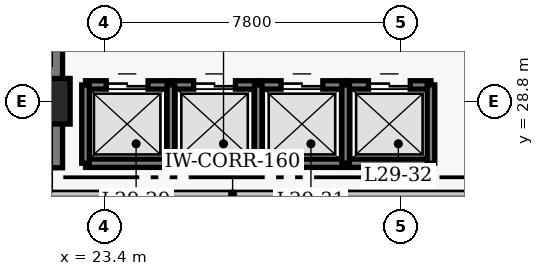
"""IFC4 building model, lengths in metres.
Left out: names, types, materials, properties, quantities, classifications, styles, units other than length and angle.
Written with IfcOpenShell. Run it as: python <this file> out.ifc"""

import sys

from ifc_helpers import new_model, si_unit, direction, frame, frame_2d, origin, origin_2d, place, context, subcontext, project, spatial, rectangle, extrude, element, fill, save


model = new_model("IFC4")
c1 = context("Model", 3, precision=1e-05, world=origin(), true_north=direction((0.0, 1.0)))
c2 = subcontext(c1, "Body", "Model", "MODEL_VIEW")
j1 = project(units=[si_unit("LENGTHUNIT", "METRE"), si_unit("PLANEANGLEUNIT", "RADIAN")], contexts=[c1])
p1 = place(None, origin())
s1 = spatial("IfcSite", under=j1, at=p1, CompositionType="ELEMENT")
p2 = place(p1, origin())
s2 = spatial("IfcBuilding", under=s1, at=p2, CompositionType="ELEMENT")
p3 = place(p2, frame((0.0, 0.0, 118.4)))
s3 = spatial("IfcBuildingStorey", under=s2, at=p3, CompositionType="ELEMENT", Elevation=118.4)
p4 = place(p3, frame((21.9, 27.05, 0.0), z_axis=(0.0, 0.0, 1.0), x_axis=(0.0, 1.0, 0.0)))
e1 = element("IfcWall", 1, at=p4, inside=s3, PredefinedType="SHEAR", context=c2, shape_type="SweptSolid", body=[
    extrude(rectangle(XDim=13.67, YDim=0.8, at=frame_2d((6.835, 0.0))), origin(), (0.0, 0.0, 1.0), 3.8),
])
p5 = place(p3, frame((21.9, 28.8, 0.0), z_axis=(0.0, 0.0, 1.0), x_axis=(1.0, 0.0, 0.0)))
e2 = element("IfcColumn", 2, at=p5, inside=s3, PredefinedType="COLUMN", context=c2, shape_type="SweptSolid", body=[
    extrude(rectangle(XDim=1.2, YDim=1.2, at=origin_2d()), origin(), (0.0, 0.0, 1.0), 3.8),
])
p6 = place(p3, frame((22.905, 29.23, 0.0), z_axis=(0.0, 0.0, 1.0), x_axis=(1.0, 0.0, 0.0)))
e3 = element("IfcWall", 3, at=p6, inside=s3, PredefinedType="SHEAR", context=c2, shape_type="SweptSolid", body=[
    extrude(rectangle(XDim=2.245, YDim=0.22, at=frame_2d((1.123, 0.0))), origin(), (0.0, 0.0, 1.0), 3.8),
])
p7 = place(p6, frame((0.545, 0.0, 0.0)))
e4 = element("IfcOpeningElement", 4, at=p7, cuts=e3, PredefinedType="OPENING", context=c2, shape_type="SweptSolid", body=[
    extrude(rectangle(XDim=1.1, YDim=2.15, at=frame_2d((0.55, 1.075))), frame((0.0, 0.12, 0.0), z_axis=(0.0, -1.0, 0.0), x_axis=(1.0, 0.0, 0.0)), (0.0, 0.0, 1.0), 0.24),
])
p8 = place(p3, frame((22.905, 27.17, 0.0), z_axis=(0.0, 0.0, 1.0), x_axis=(1.0, 0.0, 0.0)))
e5 = element("IfcWall", 5, at=p8, inside=s3, PredefinedType="SHEAR", context=c2, shape_type="SweptSolid", body=[
    extrude(rectangle(XDim=2.245, YDim=0.22, at=frame_2d((1.123, 0.0))), origin(), (0.0, 0.0, 1.0), 3.8),
])
p9 = place(p3, frame((22.905, 27.17, 0.0), z_axis=(0.0, 0.0, 1.0), x_axis=(0.0, 1.0, 0.0)))
e6 = element("IfcWall", 6, at=p9, inside=s3, PredefinedType="SHEAR", context=c2, shape_type="SweptSolid", body=[
    extrude(rectangle(XDim=2.06, YDim=0.2, at=frame_2d((1.03, 0.0))), origin(), (0.0, 0.0, 1.0), 3.8),
])
p10 = place(p3, frame((25.15, 29.23, 0.0), z_axis=(0.0, 0.0, 1.0), x_axis=(1.0, 0.0, 0.0)))
e7 = element("IfcWall", 7, at=p10, inside=s3, PredefinedType="SHEAR", context=c2, shape_type="SweptSolid", body=[
    extrude(rectangle(XDim=2.3, YDim=0.22, at=frame_2d((1.15, 0.0))), origin(), (0.0, 0.0, 1.0), 3.8),
])
p11 = place(p10, frame((0.6, 0.0, 0.0)))
e8 = element("IfcOpeningElement", 8, at=p11, cuts=e7, PredefinedType="OPENING", context=c2, shape_type="SweptSolid", body=[
    extrude(rectangle(XDim=1.1, YDim=2.15, at=frame_2d((0.55, 1.075))), frame((0.0, 0.12, 0.0), z_axis=(0.0, -1.0, 0.0), x_axis=(1.0, 0.0, 0.0)), (0.0, 0.0, 1.0), 0.24),
])
p12 = place(p3, frame((25.15, 27.17, 0.0), z_axis=(0.0, 0.0, 1.0), x_axis=(1.0, 0.0, 0.0)))
e9 = element("IfcWall", 9, at=p12, inside=s3, PredefinedType="SHEAR", context=c2, shape_type="SweptSolid", body=[
    extrude(rectangle(XDim=2.3, YDim=0.22, at=frame_2d((1.15, 0.0))), origin(), (0.0, 0.0, 1.0), 3.8),
])
p13 = place(p3, frame((25.15, 27.17, 0.0), z_axis=(0.0, 0.0, 1.0), x_axis=(0.0, 1.0, 0.0)))
e10 = element("IfcWall", 10, at=p13, inside=s3, PredefinedType="SHEAR", context=c2, shape_type="SweptSolid", body=[
    extrude(rectangle(XDim=2.06, YDim=0.2, at=frame_2d((1.03, 0.0))), origin(), (0.0, 0.0, 1.0), 3.8),
])
p14 = place(p3, frame((27.45, 29.23, 0.0), z_axis=(0.0, 0.0, 1.0), x_axis=(1.0, 0.0, 0.0)))
e11 = element("IfcWall", 11, at=p14, inside=s3, PredefinedType="SHEAR", context=c2, shape_type="SweptSolid", body=[
    extrude(rectangle(XDim=2.3, YDim=0.22, at=frame_2d((1.15, 0.0))), origin(), (0.0, 0.0, 1.0), 3.8),
])
p15 = place(p14, frame((0.6, 0.0, 0.0)))
e12 = element("IfcOpeningElement", 12, at=p15, cuts=e11, PredefinedType="OPENING", context=c2, shape_type="SweptSolid", body=[
    extrude(rectangle(XDim=1.1, YDim=2.15, at=frame_2d((0.55, 1.075))), frame((0.0, 0.12, 0.0), z_axis=(0.0, -1.0, 0.0), x_axis=(1.0, 0.0, 0.0)), (0.0, 0.0, 1.0), 0.24),
])
p16 = place(p3, frame((27.45, 27.17, 0.0), z_axis=(0.0, 0.0, 1.0), x_axis=(1.0, 0.0, 0.0)))
e13 = element("IfcWall", 13, at=p16, inside=s3, PredefinedType="SHEAR", context=c2, shape_type="SweptSolid", body=[
    extrude(rectangle(XDim=2.3, YDim=0.22, at=frame_2d((1.15, 0.0))), origin(), (0.0, 0.0, 1.0), 3.8),
])
p17 = place(p3, frame((27.45, 27.17, 0.0), z_axis=(0.0, 0.0, 1.0), x_axis=(0.0, 1.0, 0.0)))
e14 = element("IfcWall", 14, at=p17, inside=s3, PredefinedType="SHEAR", context=c2, shape_type="SweptSolid", body=[
    extrude(rectangle(XDim=2.06, YDim=0.2, at=frame_2d((1.03, 0.0))), origin(), (0.0, 0.0, 1.0), 3.8),
])
p18 = place(p3, frame((29.75, 29.23, 0.0), z_axis=(0.0, 0.0, 1.0), x_axis=(1.0, 0.0, 0.0)))
e15 = element("IfcWall", 15, at=p18, inside=s3, PredefinedType="SHEAR", context=c2, shape_type="SweptSolid", body=[
    extrude(rectangle(XDim=2.245, YDim=0.22, at=frame_2d((1.123, 0.0))), origin(), (0.0, 0.0, 1.0), 3.8),
])
p19 = place(p18, frame((0.6, 0.0, 0.0)))
e16 = element("IfcOpeningElement", 16, at=p19, cuts=e15, PredefinedType="OPENING", context=c2, shape_type="SweptSolid", body=[
    extrude(rectangle(XDim=1.1, YDim=2.15, at=frame_2d((0.55, 1.075))), frame((0.0, 0.12, 0.0), z_axis=(0.0, -1.0, 0.0), x_axis=(1.0, 0.0, 0.0)), (0.0, 0.0, 1.0), 0.24),
])
p20 = place(p3, frame((29.75, 27.17, 0.0), z_axis=(0.0, 0.0, 1.0), x_axis=(1.0, 0.0, 0.0)))
e17 = element("IfcWall", 17, at=p20, inside=s3, PredefinedType="SHEAR", context=c2, shape_type="SweptSolid", body=[
    extrude(rectangle(XDim=2.245, YDim=0.22, at=frame_2d((1.123, 0.0))), origin(), (0.0, 0.0, 1.0), 3.8),
])
for number, where, z_axis, x_axis in (
    (18, (29.75, 27.17, 0.0), (0.0, 0.0, 1.0), (0.0, 1.0, 0.0)),
    (19, (31.995, 27.17, 0.0), (0.0, 0.0, 1.0), (0.0, 1.0, 0.0)),
):
    element("IfcWall", number, at=place(p3, frame(where, z_axis=z_axis, x_axis=x_axis)), inside=s3, PredefinedType="SHEAR", context=c2, shape_type="SweptSolid", body=[
        extrude(rectangle(XDim=2.06, YDim=0.2, at=frame_2d((1.03, 0.0))), origin(), (0.0, 0.0, 1.0), 3.8),
    ])
p21 = place(p3, frame((19.9, 26.36, 0.0), z_axis=(0.0, 0.0, 1.0), x_axis=(1.0, 0.0, 0.0)))
e20 = element("IfcWall", 20, at=p21, inside=s3, PredefinedType="PARTITIONING", context=c2, shape_type="SweptSolid", body=[
    extrude(rectangle(XDim=13.75, YDim=0.16, at=frame_2d((6.875, 0.0))), origin(), (0.0, 0.0, 1.0), 3.54),
])
p22 = place(p7, origin())
e21 = element("IfcDoor", 21, at=p22, inside=s3, OperationType="DOUBLE_DOOR_SLIDING", PredefinedType="DOOR", context=c2, shape_type="SweptSolid", body=[
    extrude(rectangle(XDim=1.1, YDim=2.15, at=frame_2d((0.55, 1.075))), frame((0.0, 0.025, 0.0), z_axis=(0.0, -1.0, 0.0), x_axis=(1.0, 0.0, 0.0)), (0.0, 0.0, 1.0), 0.05),
])
fill(e4, e21)
p23 = place(p11, origin())
e22 = element("IfcDoor", 22, at=p23, inside=s3, OperationType="DOUBLE_DOOR_SLIDING", PredefinedType="DOOR", context=c2, shape_type="SweptSolid", body=[
    extrude(rectangle(XDim=1.1, YDim=2.15, at=frame_2d((0.55, 1.075))), frame((0.0, 0.025, 0.0), z_axis=(0.0, -1.0, 0.0), x_axis=(1.0, 0.0, 0.0)), (0.0, 0.0, 1.0), 0.05),
])
fill(e8, e22)
p24 = place(p15, origin())
e23 = element("IfcDoor", 23, at=p24, inside=s3, OperationType="DOUBLE_DOOR_SLIDING", PredefinedType="DOOR", context=c2, shape_type="SweptSolid", body=[
    extrude(rectangle(XDim=1.1, YDim=2.15, at=frame_2d((0.55, 1.075))), frame((0.0, 0.025, 0.0), z_axis=(0.0, -1.0, 0.0), x_axis=(1.0, 0.0, 0.0)), (0.0, 0.0, 1.0), 0.05),
])
fill(e12, e23)
p25 = place(p19, origin())
e24 = element("IfcDoor", 24, at=p25, inside=s3, OperationType="DOUBLE_DOOR_SLIDING", PredefinedType="DOOR", context=c2, shape_type="SweptSolid", body=[
    extrude(rectangle(XDim=1.1, YDim=2.15, at=frame_2d((0.55, 1.075))), frame((0.0, 0.025, 0.0), z_axis=(0.0, -1.0, 0.0), x_axis=(1.0, 0.0, 0.0)), (0.0, 0.0, 1.0), 0.05),
])
fill(e16, e24)
save(model, sys.argv[1])
